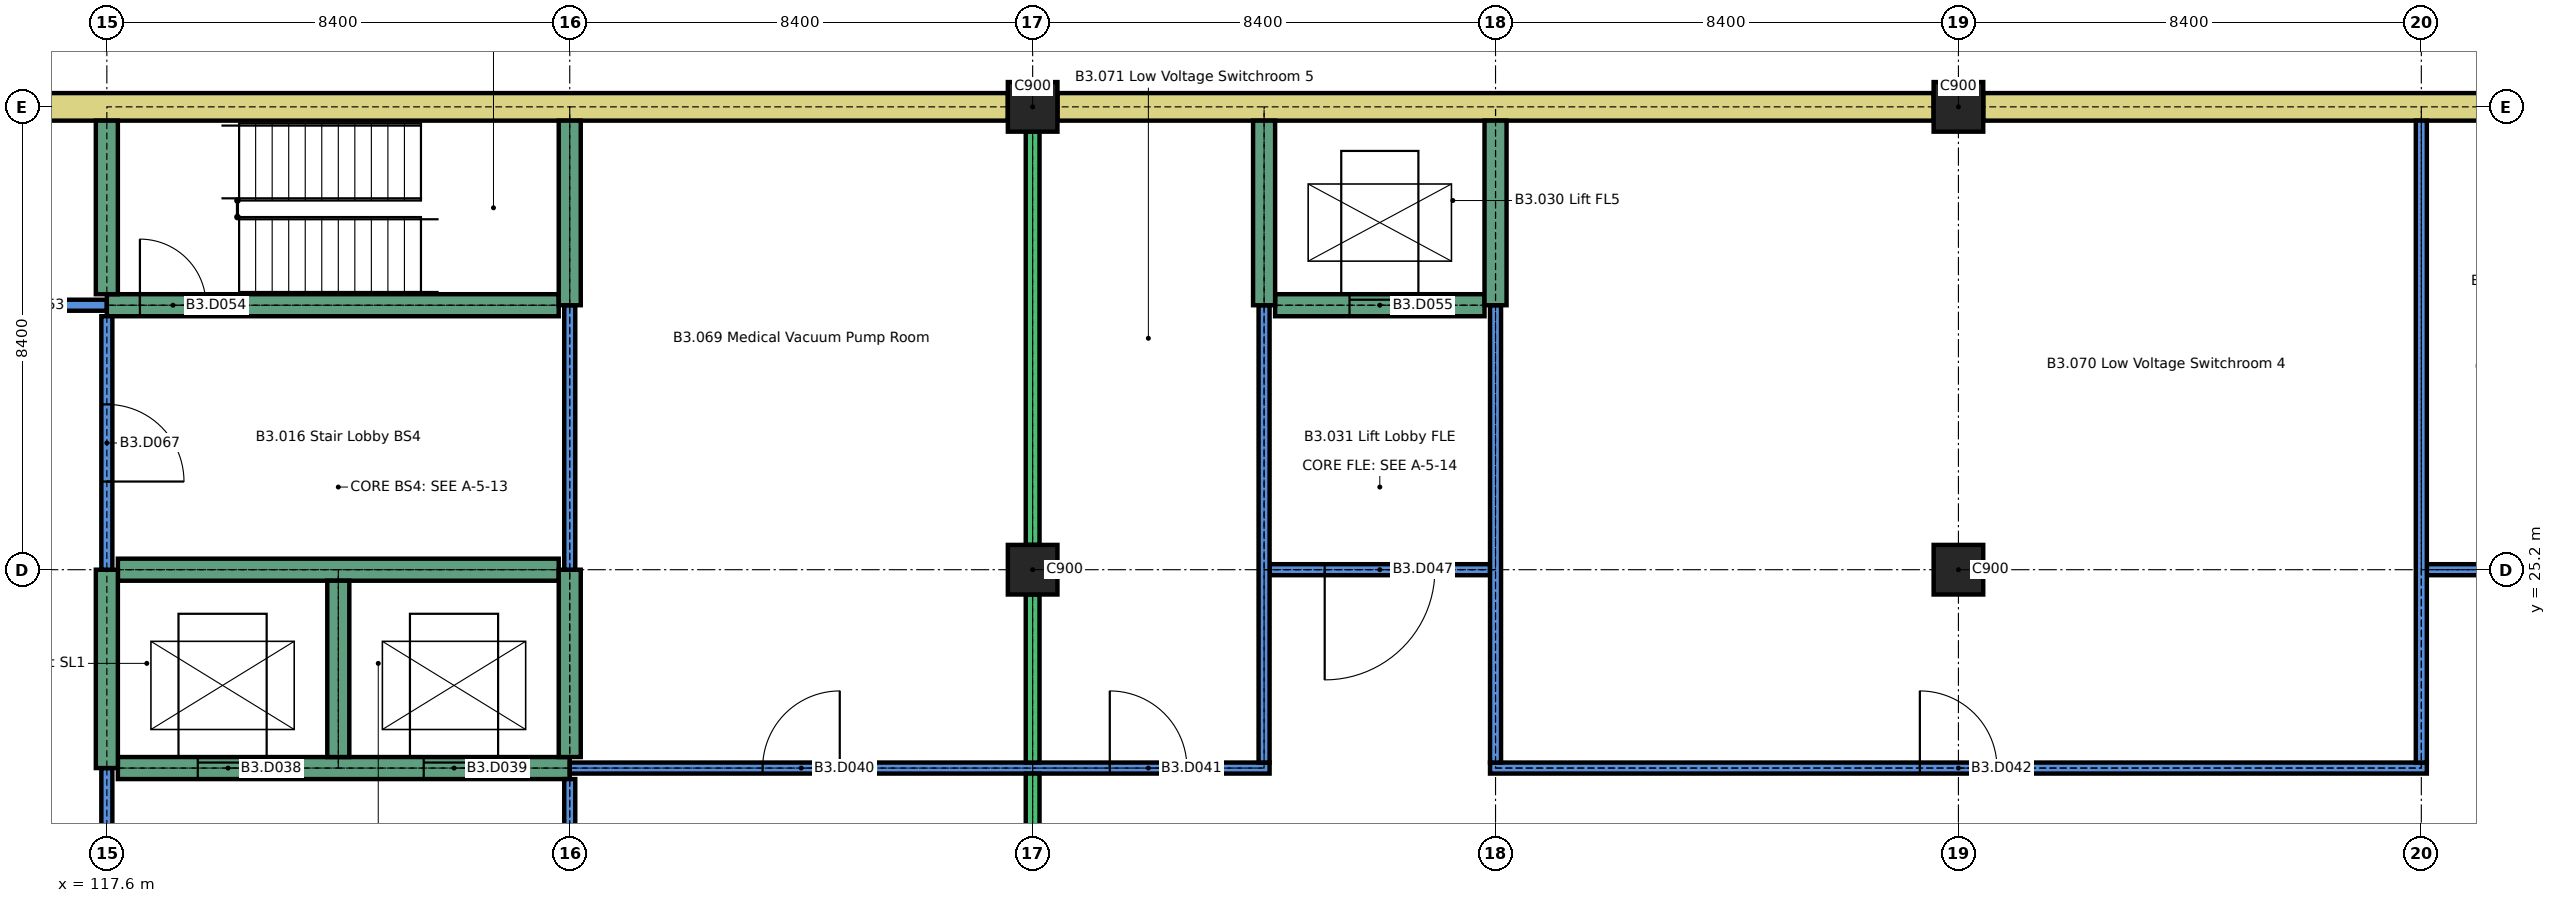
"""IFC4 building model, lengths in metres.
Left out: names, types, materials, properties, quantities, classifications, styles, units other than length and angle.
Written with IfcOpenShell. Run it as: python <this file> out.ifc"""

import sys

from ifc_helpers import new_model, si_unit, direction, frame, frame_2d, origin, origin_2d, place, context, subcontext, project, spatial, rectangle, extrude, element, fill, save


model = new_model("IFC4")
c1 = context("Model", 3, precision=1e-05, world=origin(), true_north=direction((0.0, 1.0)))
c2 = subcontext(c1, "Body", "Model", "MODEL_VIEW")
j1 = project(units=[si_unit("LENGTHUNIT", "METRE"), si_unit("PLANEANGLEUNIT", "RADIAN")], contexts=[c1])
p1 = place(None, origin())
s1 = spatial("IfcSite", under=j1, at=p1, CompositionType="ELEMENT")
p2 = place(p1, origin())
s2 = spatial("IfcBuilding", under=s1, at=p2, CompositionType="ELEMENT")
p3 = place(p2, frame((0.0, 0.0, -11.4)))
s3 = spatial("IfcBuildingStorey", under=s2, at=p3, CompositionType="ELEMENT", Elevation=-11.4)
for number, where, z_axis, x_axis in (
    (1, (134.4, 25.2, 0.0), (0.0, 0.0, 1.0), (1.0, 0.0, 0.0)),
    (2, (151.2, 25.2, 0.0), (0.0, 0.0, 1.0), (1.0, 0.0, 0.0)),
    (3, (134.4, 33.6, 0.0), (0.0, 0.0, 1.0), (1.0, 0.0, 0.0)),
    (4, (151.2, 33.6, 0.0), (0.0, 0.0, 1.0), (1.0, 0.0, 0.0)),
):
    element("IfcColumn", number, at=place(p3, frame(where, z_axis=z_axis, x_axis=x_axis)), inside=s3, PredefinedType="COLUMN", context=c2, shape_type="SweptSolid", body=[
        extrude(rectangle(XDim=0.9, YDim=0.9, at=origin_2d()), origin(), (0.0, 0.0, 1.0), 3.2),
    ])
p4 = place(p3, frame((101.25, 33.6, 0.0), z_axis=(0.0, 0.0, 1.0), x_axis=(1.0, 0.0, 0.0)))
e5 = element("IfcWall", 5, at=p4, inside=s3, PredefinedType="SOLIDWALL", context=c2, shape_type="SweptSolid", body=[
    extrude(rectangle(XDim=32.7, YDim=0.5, at=frame_2d((16.35, 0.0))), origin(), (0.0, 0.0, 1.0), 3.2),
])
p5 = place(p3, frame((134.85, 33.6, 0.0), z_axis=(0.0, 0.0, 1.0), x_axis=(1.0, 0.0, 0.0)))
e6 = element("IfcWall", 6, at=p5, inside=s3, PredefinedType="SOLIDWALL", context=c2, shape_type="SweptSolid", body=[
    extrude(rectangle(XDim=15.9, YDim=0.5, at=frame_2d((7.95, 0.0))), origin(), (0.0, 0.0, 1.0), 3.2),
])
p6 = place(p3, frame((151.65, 33.6, 0.0), z_axis=(0.0, 0.0, 1.0), x_axis=(1.0, 0.0, 0.0)))
e7 = element("IfcWall", 7, at=p6, inside=s3, PredefinedType="SOLIDWALL", context=c2, shape_type="SweptSolid", body=[
    extrude(rectangle(XDim=16.1, YDim=0.5, at=frame_2d((8.05, 0.0))), origin(), (0.0, 0.0, 1.0), 3.2),
])
p7 = place(p3, frame((117.8, 21.6, 0.0), z_axis=(0.0, 0.0, 1.0), x_axis=(1.0, 0.0, 0.0)))
e8 = element("IfcWall", 8, at=p7, inside=s3, PredefinedType="SHEAR", context=c2, shape_type="SweptSolid", body=[
    extrude(rectangle(XDim=8.2, YDim=0.4, at=frame_2d((4.1, 0.0))), origin(), (0.0, 0.0, 1.0), 3.2),
])
p8 = place(p7, frame((1.45, 0.0, 0.0)))
e9 = element("IfcOpeningElement", 9, at=p8, cuts=e8, PredefinedType="OPENING", context=c2, shape_type="SweptSolid", body=[
    extrude(rectangle(XDim=1.1, YDim=2.1, at=frame_2d((0.55, 1.05))), frame((0.0, 0.21, 0.0), z_axis=(0.0, -1.0, 0.0), x_axis=(1.0, 0.0, 0.0)), (0.0, 0.0, 1.0), 0.42),
])
p9 = place(p7, frame((5.55, 0.0, 0.0)))
e10 = element("IfcOpeningElement", 10, at=p9, cuts=e8, PredefinedType="OPENING", context=c2, shape_type="SweptSolid", body=[
    extrude(rectangle(XDim=1.1, YDim=2.1, at=frame_2d((0.55, 1.05))), frame((0.0, 0.21, 0.0), z_axis=(0.0, -1.0, 0.0), x_axis=(1.0, 0.0, 0.0)), (0.0, 0.0, 1.0), 0.42),
])
p10 = place(p3, frame((126.0, 21.6, 0.0), z_axis=(0.0, 0.0, 1.0), x_axis=(1.0, 0.0, 0.0)))
e11 = element("IfcWall", 11, at=p10, inside=s3, PredefinedType="PARTITIONING", context=c2, shape_type="SweptSolid", body=[
    extrude(rectangle(XDim=12.7, YDim=0.2, at=frame_2d((6.35, 0.0))), origin(), (0.0, 0.0, 1.0), 3.2),
])
p11 = place(p10, frame((3.5, 0.0, 0.0)))
e12 = element("IfcOpeningElement", 12, at=p11, cuts=e11, PredefinedType="OPENING", context=c2, shape_type="SweptSolid", body=[
    extrude(rectangle(XDim=1.4, YDim=2.1, at=frame_2d((0.7, 1.05))), frame((0.0, 0.11, 0.0), z_axis=(0.0, -1.0, 0.0), x_axis=(1.0, 0.0, 0.0)), (0.0, 0.0, 1.0), 0.22),
])
p12 = place(p10, frame((9.8, 0.0, 0.0)))
e13 = element("IfcOpeningElement", 13, at=p12, cuts=e11, PredefinedType="OPENING", context=c2, shape_type="SweptSolid", body=[
    extrude(rectangle(XDim=1.4, YDim=2.1, at=frame_2d((0.7, 1.05))), frame((0.0, 0.11, 0.0), z_axis=(0.0, -1.0, 0.0), x_axis=(1.0, 0.0, 0.0)), (0.0, 0.0, 1.0), 0.22),
])
p13 = place(p3, frame((142.7, 21.6, 0.0), z_axis=(0.0, 0.0, 1.0), x_axis=(1.0, 0.0, 0.0)))
e14 = element("IfcWall", 14, at=p13, inside=s3, PredefinedType="PARTITIONING", context=c2, shape_type="SweptSolid", body=[
    extrude(rectangle(XDim=17.0, YDim=0.2, at=frame_2d((8.5, 0.0))), origin(), (0.0, 0.0, 1.0), 3.2),
])
p14 = place(p13, frame((7.8, 0.0, 0.0)))
e15 = element("IfcOpeningElement", 15, at=p14, cuts=e14, PredefinedType="OPENING", context=c2, shape_type="SweptSolid", body=[
    extrude(rectangle(XDim=1.4, YDim=2.1, at=frame_2d((0.7, 1.05))), frame((0.0, 0.11, 0.0), z_axis=(0.0, -1.0, 0.0), x_axis=(1.0, 0.0, 0.0)), (0.0, 0.0, 1.0), 0.22),
])
p15 = place(p3, frame((117.8, 25.2, 0.0), z_axis=(0.0, 0.0, 1.0), x_axis=(1.0, 0.0, 0.0)))
e16 = element("IfcWall", 16, at=p15, inside=s3, PredefinedType="SHEAR", context=c2, shape_type="SweptSolid", body=[
    extrude(rectangle(XDim=8.0, YDim=0.4, at=frame_2d((4.0, 0.0))), origin(), (0.0, 0.0, 1.0), 3.2),
])
p16 = place(p3, frame((138.7, 25.2, 0.0), z_axis=(0.0, 0.0, 1.0), x_axis=(1.0, 0.0, 0.0)))
e17 = element("IfcWall", 17, at=p16, inside=s3, PredefinedType="PARTITIONING", context=c2, shape_type="SweptSolid", body=[
    extrude(rectangle(XDim=4.0, YDim=0.2, at=frame_2d((2.0, 0.0))), origin(), (0.0, 0.0, 1.0), 3.2),
])
p17 = place(p16, frame((1.0, 0.0, 0.0)))
e18 = element("IfcOpeningElement", 18, at=p17, cuts=e17, PredefinedType="OPENING", context=c2, shape_type="SweptSolid", body=[
    extrude(rectangle(XDim=2.0, YDim=2.4, at=frame_2d((1.0, 1.2))), frame((0.0, 0.11, 0.0), z_axis=(0.0, -1.0, 0.0), x_axis=(1.0, 0.0, 0.0)), (0.0, 0.0, 1.0), 0.22),
])
p18 = place(p3, frame((159.7, 25.2, 0.0), z_axis=(0.0, 0.0, 1.0), x_axis=(1.0, 0.0, 0.0)))
e19 = element("IfcWall", 19, at=p18, inside=s3, PredefinedType="PARTITIONING", context=c2, shape_type="SweptSolid", body=[
    extrude(rectangle(XDim=4.7, YDim=0.2, at=frame_2d((2.35, 0.0))), origin(), (0.0, 0.0, 1.0), 3.2),
])
p19 = place(p18, frame((1.65, 0.0, 0.0)))
e20 = element("IfcOpeningElement", 20, at=p19, cuts=e19, PredefinedType="OPENING", context=c2, shape_type="SweptSolid", body=[
    extrude(rectangle(XDim=1.4, YDim=2.1, at=frame_2d((0.7, 1.05))), frame((0.0, 0.11, 0.0), z_axis=(0.0, -1.0, 0.0), x_axis=(1.0, 0.0, 0.0)), (0.0, 0.0, 1.0), 0.22),
])
p20 = place(p3, frame((113.3, 30.0, 0.0), z_axis=(0.0, 0.0, 1.0), x_axis=(1.0, 0.0, 0.0)))
e21 = element("IfcWall", 21, at=p20, inside=s3, PredefinedType="PARTITIONING", context=c2, shape_type="SweptSolid", body=[
    extrude(rectangle(XDim=4.3, YDim=0.2, at=frame_2d((2.15, 0.0))), origin(), (0.0, 0.0, 1.0), 3.2),
])
p21 = place(p20, frame((1.5, 0.0, 0.0)))
e22 = element("IfcOpeningElement", 22, at=p21, cuts=e21, PredefinedType="OPENING", context=c2, shape_type="SweptSolid", body=[
    extrude(rectangle(XDim=1.4, YDim=2.1, at=frame_2d((0.7, 1.05))), frame((0.0, 0.11, 0.0), z_axis=(0.0, -1.0, 0.0), x_axis=(1.0, 0.0, 0.0)), (0.0, 0.0, 1.0), 0.22),
])
p22 = place(p3, frame((117.6, 30.0, 0.0), z_axis=(0.0, 0.0, 1.0), x_axis=(1.0, 0.0, 0.0)))
e23 = element("IfcWall", 23, at=p22, inside=s3, PredefinedType="SHEAR", context=c2, shape_type="SweptSolid", body=[
    extrude(rectangle(XDim=8.2, YDim=0.4, at=frame_2d((4.1, 0.0))), origin(), (0.0, 0.0, 1.0), 3.2),
])
p23 = place(p22, frame((0.6, 0.0, 0.0)))
e24 = element("IfcOpeningElement", 24, at=p23, cuts=e23, PredefinedType="OPENING", context=c2, shape_type="SweptSolid", body=[
    extrude(rectangle(XDim=1.2, YDim=2.1, at=frame_2d((0.6, 1.05))), frame((0.0, 0.21, 0.0), z_axis=(0.0, -1.0, 0.0), x_axis=(1.0, 0.0, 0.0)), (0.0, 0.0, 1.0), 0.42),
])
p24 = place(p3, frame((138.8, 30.0, 0.0), z_axis=(0.0, 0.0, 1.0), x_axis=(1.0, 0.0, 0.0)))
e25 = element("IfcWall", 25, at=p24, inside=s3, PredefinedType="SHEAR", context=c2, shape_type="SweptSolid", body=[
    extrude(rectangle(XDim=3.8, YDim=0.4, at=frame_2d((1.9, 0.0))), origin(), (0.0, 0.0, 1.0), 3.2),
])
p25 = place(p24, frame((1.35, 0.0, 0.0)))
e26 = element("IfcOpeningElement", 26, at=p25, cuts=e25, PredefinedType="OPENING", context=c2, shape_type="SweptSolid", body=[
    extrude(rectangle(XDim=1.1, YDim=2.1, at=frame_2d((0.55, 1.05))), frame((0.0, 0.21, 0.0), z_axis=(0.0, -1.0, 0.0), x_axis=(1.0, 0.0, 0.0)), (0.0, 0.0, 1.0), 0.42),
])
p26 = place(p3, frame((117.6, 16.9, 0.0), z_axis=(0.0, 0.0, 1.0), x_axis=(0.0, 1.0, 0.0)))
e27 = element("IfcWall", 27, at=p26, inside=s3, PredefinedType="PARTITIONING", context=c2, shape_type="SweptSolid", body=[
    extrude(rectangle(XDim=4.7, YDim=0.2, at=frame_2d((2.35, 0.0))), origin(), (0.0, 0.0, 1.0), 3.2),
])
p27 = place(p26, frame((1.35, 0.0, 0.0)))
e28 = element("IfcOpeningElement", 28, at=p27, cuts=e27, PredefinedType="OPENING", context=c2, shape_type="SweptSolid", body=[
    extrude(rectangle(XDim=2.0, YDim=2.4, at=frame_2d((1.0, 1.2))), frame((0.0, 0.11, 0.0), z_axis=(0.0, -1.0, 0.0), x_axis=(1.0, 0.0, 0.0)), (0.0, 0.0, 1.0), 0.22),
])
p28 = place(p3, frame((117.6, 21.6, 0.0), z_axis=(0.0, 0.0, 1.0), x_axis=(0.0, 1.0, 0.0)))
e29 = element("IfcWall", 29, at=p28, inside=s3, PredefinedType="SHEAR", context=c2, shape_type="SweptSolid", body=[
    extrude(rectangle(XDim=3.6, YDim=0.4, at=frame_2d((1.8, 0.0))), origin(), (0.0, 0.0, 1.0), 3.2),
])
p29 = place(p3, frame((117.6, 25.2, 0.0), z_axis=(0.0, 0.0, 1.0), x_axis=(0.0, 1.0, 0.0)))
e30 = element("IfcWall", 30, at=p29, inside=s3, PredefinedType="PARTITIONING", context=c2, shape_type="SweptSolid", body=[
    extrude(rectangle(XDim=4.6, YDim=0.2, at=frame_2d((2.3, 0.0))), origin(), (0.0, 0.0, 1.0), 3.2),
])
p30 = place(p29, frame((1.6, 0.0, 0.0)))
e31 = element("IfcOpeningElement", 31, at=p30, cuts=e30, PredefinedType="OPENING", context=c2, shape_type="SweptSolid", body=[
    extrude(rectangle(XDim=1.4, YDim=2.1, at=frame_2d((0.7, 1.05))), frame((0.0, 0.11, 0.0), z_axis=(0.0, -1.0, 0.0), x_axis=(1.0, 0.0, 0.0)), (0.0, 0.0, 1.0), 0.22),
])
p31 = place(p3, frame((117.6, 30.2, 0.0), z_axis=(0.0, 0.0, 1.0), x_axis=(0.0, 1.0, 0.0)))
e32 = element("IfcWall", 32, at=p31, inside=s3, PredefinedType="SHEAR", context=c2, shape_type="SweptSolid", body=[
    extrude(rectangle(XDim=3.15, YDim=0.4, at=frame_2d((1.575, 0.0))), origin(), (0.0, 0.0, 1.0), 3.2),
])
p32 = place(p3, frame((121.8, 21.8, 0.0), z_axis=(0.0, 0.0, 1.0), x_axis=(0.0, 1.0, 0.0)))
e33 = element("IfcWall", 33, at=p32, inside=s3, PredefinedType="SHEAR", context=c2, shape_type="SweptSolid", body=[
    extrude(rectangle(XDim=3.2, YDim=0.4, at=frame_2d((1.6, 0.0))), origin(), (0.0, 0.0, 1.0), 3.2),
])
p33 = place(p3, frame((126.0, 16.9, 0.0), z_axis=(0.0, 0.0, 1.0), x_axis=(0.0, 1.0, 0.0)))
e34 = element("IfcWall", 34, at=p33, inside=s3, PredefinedType="PARTITIONING", context=c2, shape_type="SweptSolid", body=[
    extrude(rectangle(XDim=4.5, YDim=0.2, at=frame_2d((2.25, 0.0))), origin(), (0.0, 0.0, 1.0), 3.2),
])
p34 = place(p33, frame((1.25, 0.0, 0.0)))
e35 = element("IfcOpeningElement", 35, at=p34, cuts=e34, PredefinedType="OPENING", context=c2, shape_type="SweptSolid", body=[
    extrude(rectangle(XDim=2.0, YDim=2.4, at=frame_2d((1.0, 1.2))), frame((0.0, 0.11, 0.0), z_axis=(0.0, -1.0, 0.0), x_axis=(1.0, 0.0, 0.0)), (0.0, 0.0, 1.0), 0.22),
])
p35 = place(p3, frame((126.0, 21.8, 0.0), z_axis=(0.0, 0.0, 1.0), x_axis=(0.0, 1.0, 0.0)))
e36 = element("IfcWall", 36, at=p35, inside=s3, PredefinedType="SHEAR", context=c2, shape_type="SweptSolid", body=[
    extrude(rectangle(XDim=3.4, YDim=0.4, at=frame_2d((1.7, 0.0))), origin(), (0.0, 0.0, 1.0), 3.2),
])
p36 = place(p3, frame((126.0, 25.2, 0.0), z_axis=(0.0, 0.0, 1.0), x_axis=(0.0, 1.0, 0.0)))
e37 = element("IfcWall", 37, at=p36, inside=s3, PredefinedType="PARTITIONING", context=c2, shape_type="SweptSolid", body=[
    extrude(rectangle(XDim=4.8, YDim=0.2, at=frame_2d((2.4, 0.0))), origin(), (0.0, 0.0, 1.0), 3.2),
])
p37 = place(p3, frame((126.0, 30.0, 0.0), z_axis=(0.0, 0.0, 1.0), x_axis=(0.0, 1.0, 0.0)))
e38 = element("IfcWall", 38, at=p37, inside=s3, PredefinedType="SHEAR", context=c2, shape_type="SweptSolid", body=[
    extrude(rectangle(XDim=3.35, YDim=0.4, at=frame_2d((1.675, 0.0))), origin(), (0.0, 0.0, 1.0), 3.2),
])
p38 = place(p3, frame((134.4, 17.25, 0.0), z_axis=(0.0, 0.0, 1.0), x_axis=(0.0, 1.0, 0.0)))
e39 = element("IfcWall", 39, at=p38, inside=s3, PredefinedType="SOLIDWALL", context=c2, shape_type="SweptSolid", body=[
    extrude(rectangle(XDim=4.25, YDim=0.25, at=frame_2d((2.125, 0.0))), origin(), (0.0, 0.0, 1.0), 3.2),
])
p39 = place(p38, frame((1.425, 0.0, 0.0)))
e40 = element("IfcOpeningElement", 40, at=p39, cuts=e39, PredefinedType="OPENING", context=c2, shape_type="SweptSolid", body=[
    extrude(rectangle(XDim=1.4, YDim=2.1, at=frame_2d((0.7, 1.05))), frame((0.0, 0.135, 0.0), z_axis=(0.0, -1.0, 0.0), x_axis=(1.0, 0.0, 0.0)), (0.0, 0.0, 1.0), 0.27),
])
p40 = place(p3, frame((134.4, 21.7, 0.0), z_axis=(0.0, 0.0, 1.0), x_axis=(0.0, 1.0, 0.0)))
e41 = element("IfcWall", 41, at=p40, inside=s3, PredefinedType="SOLIDWALL", context=c2, shape_type="SweptSolid", body=[
    extrude(rectangle(XDim=3.05, YDim=0.25, at=frame_2d((1.525, 0.0))), origin(), (0.0, 0.0, 1.0), 3.2),
])
p41 = place(p3, frame((134.4, 25.65, 0.0), z_axis=(0.0, 0.0, 1.0), x_axis=(0.0, 1.0, 0.0)))
e42 = element("IfcWall", 42, at=p41, inside=s3, PredefinedType="SOLIDWALL", context=c2, shape_type="SweptSolid", body=[
    extrude(rectangle(XDim=7.5, YDim=0.25, at=frame_2d((3.75, 0.0))), origin(), (0.0, 0.0, 1.0), 3.2),
])
p42 = place(p3, frame((138.6, 21.7, 0.0), z_axis=(0.0, 0.0, 1.0), x_axis=(0.0, 1.0, 0.0)))
e43 = element("IfcWall", 43, at=p42, inside=s3, PredefinedType="PARTITIONING", context=c2, shape_type="SweptSolid", body=[
    extrude(rectangle(XDim=8.3, YDim=0.2, at=frame_2d((4.15, 0.0))), origin(), (0.0, 0.0, 1.0), 3.2),
])
p43 = place(p3, frame((138.6, 30.0, 0.0), z_axis=(0.0, 0.0, 1.0), x_axis=(0.0, 1.0, 0.0)))
e44 = element("IfcWall", 44, at=p43, inside=s3, PredefinedType="SHEAR", context=c2, shape_type="SweptSolid", body=[
    extrude(rectangle(XDim=3.35, YDim=0.4, at=frame_2d((1.675, 0.0))), origin(), (0.0, 0.0, 1.0), 3.2),
])
p44 = place(p3, frame((142.8, 21.7, 0.0), z_axis=(0.0, 0.0, 1.0), x_axis=(0.0, 1.0, 0.0)))
e45 = element("IfcWall", 45, at=p44, inside=s3, PredefinedType="PARTITIONING", context=c2, shape_type="SweptSolid", body=[
    extrude(rectangle(XDim=8.3, YDim=0.2, at=frame_2d((4.15, 0.0))), origin(), (0.0, 0.0, 1.0), 3.2),
])
p45 = place(p3, frame((142.8, 30.0, 0.0), z_axis=(0.0, 0.0, 1.0), x_axis=(0.0, 1.0, 0.0)))
e46 = element("IfcWall", 46, at=p45, inside=s3, PredefinedType="SHEAR", context=c2, shape_type="SweptSolid", body=[
    extrude(rectangle(XDim=3.35, YDim=0.4, at=frame_2d((1.675, 0.0))), origin(), (0.0, 0.0, 1.0), 3.2),
])
p46 = place(p3, frame((159.6, 21.7, 0.0), z_axis=(0.0, 0.0, 1.0), x_axis=(0.0, 1.0, 0.0)))
e47 = element("IfcWall", 47, at=p46, inside=s3, PredefinedType="PARTITIONING", context=c2, shape_type="SweptSolid", body=[
    extrude(rectangle(XDim=11.65, YDim=0.2, at=frame_2d((5.825, 0.0))), origin(), (0.0, 0.0, 1.0), 3.2),
])
p47 = place(p8, origin())
e48 = element("IfcDoor", 48, at=p47, inside=s3, OperationType="SLIDING_TO_LEFT", PredefinedType="DOOR", context=c2, shape_type="SweptSolid", body=[
    extrude(rectangle(XDim=1.1, YDim=2.1, at=frame_2d((0.55, 1.05))), frame((0.0, 0.025, 0.0), z_axis=(0.0, -1.0, 0.0), x_axis=(1.0, 0.0, 0.0)), (0.0, 0.0, 1.0), 0.05),
])
fill(e9, e48)
p48 = place(p9, origin())
e49 = element("IfcDoor", 49, at=p48, inside=s3, OperationType="SLIDING_TO_LEFT", PredefinedType="DOOR", context=c2, shape_type="SweptSolid", body=[
    extrude(rectangle(XDim=1.1, YDim=2.1, at=frame_2d((0.55, 1.05))), frame((0.0, 0.025, 0.0), z_axis=(0.0, -1.0, 0.0), x_axis=(1.0, 0.0, 0.0)), (0.0, 0.0, 1.0), 0.05),
])
fill(e10, e49)
p49 = place(p11, origin())
e50 = element("IfcDoor", 50, at=p49, inside=s3, OperationType="SINGLE_SWING_LEFT", PredefinedType="DOOR", context=c2, shape_type="SweptSolid", body=[
    extrude(rectangle(XDim=1.4, YDim=2.1, at=frame_2d((0.7, 1.05))), frame((0.0, 0.025, 0.0), z_axis=(0.0, -1.0, 0.0), x_axis=(1.0, 0.0, 0.0)), (0.0, 0.0, 1.0), 0.05),
])
fill(e12, e50)
p50 = place(p12, origin())
e51 = element("IfcDoor", 51, at=p50, inside=s3, OperationType="SINGLE_SWING_RIGHT", PredefinedType="DOOR", context=c2, shape_type="SweptSolid", body=[
    extrude(rectangle(XDim=1.4, YDim=2.1, at=frame_2d((0.7, 1.05))), frame((0.0, 0.025, 0.0), z_axis=(0.0, -1.0, 0.0), x_axis=(1.0, 0.0, 0.0)), (0.0, 0.0, 1.0), 0.05),
])
fill(e13, e51)
p51 = place(p14, origin())
e52 = element("IfcDoor", 52, at=p51, inside=s3, OperationType="SINGLE_SWING_RIGHT", PredefinedType="DOOR", context=c2, shape_type="SweptSolid", body=[
    extrude(rectangle(XDim=1.4, YDim=2.1, at=frame_2d((0.7, 1.05))), frame((0.0, 0.025, 0.0), z_axis=(0.0, -1.0, 0.0), x_axis=(1.0, 0.0, 0.0)), (0.0, 0.0, 1.0), 0.05),
])
fill(e15, e52)
p52 = place(p17, origin())
e53 = element("IfcDoor", 53, at=p52, inside=s3, OperationType="SINGLE_SWING_LEFT", PredefinedType="DOOR", context=c2, shape_type="SweptSolid", body=[
    extrude(rectangle(XDim=2.0, YDim=2.4, at=frame_2d((1.0, 1.2))), frame((0.0, 0.03, 0.0), z_axis=(0.0, -1.0, 0.0), x_axis=(1.0, 0.0, 0.0)), (0.0, 0.0, 1.0), 0.06),
])
fill(e18, e53)
p53 = place(p23, origin())
e54 = element("IfcDoor", 54, at=p53, inside=s3, OperationType="SINGLE_SWING_RIGHT", PredefinedType="DOOR", context=c2, shape_type="SweptSolid", body=[
    extrude(rectangle(XDim=1.2, YDim=2.1, at=frame_2d((0.6, 1.05))), frame((0.0, 0.025, 0.0), z_axis=(0.0, -1.0, 0.0), x_axis=(1.0, 0.0, 0.0)), (0.0, 0.0, 1.0), 0.05),
])
fill(e24, e54)
p54 = place(p25, origin())
e55 = element("IfcDoor", 55, at=p54, inside=s3, OperationType="SLIDING_TO_LEFT", PredefinedType="DOOR", context=c2, shape_type="SweptSolid", body=[
    extrude(rectangle(XDim=1.1, YDim=2.1, at=frame_2d((0.55, 1.05))), frame((0.0, 0.025, 0.0), z_axis=(0.0, -1.0, 0.0), x_axis=(1.0, 0.0, 0.0)), (0.0, 0.0, 1.0), 0.05),
])
fill(e26, e55)
p55 = place(p30, origin())
e56 = element("IfcDoor", 56, at=p55, inside=s3, OperationType="SINGLE_SWING_LEFT", PredefinedType="DOOR", context=c2, shape_type="SweptSolid", body=[
    extrude(rectangle(XDim=1.4, YDim=2.1, at=frame_2d((0.7, 1.05))), frame((0.0, 0.03, 0.0), z_axis=(0.0, -1.0, 0.0), x_axis=(1.0, 0.0, 0.0)), (0.0, 0.0, 1.0), 0.06),
])
fill(e31, e56)
save(model, sys.argv[1])
